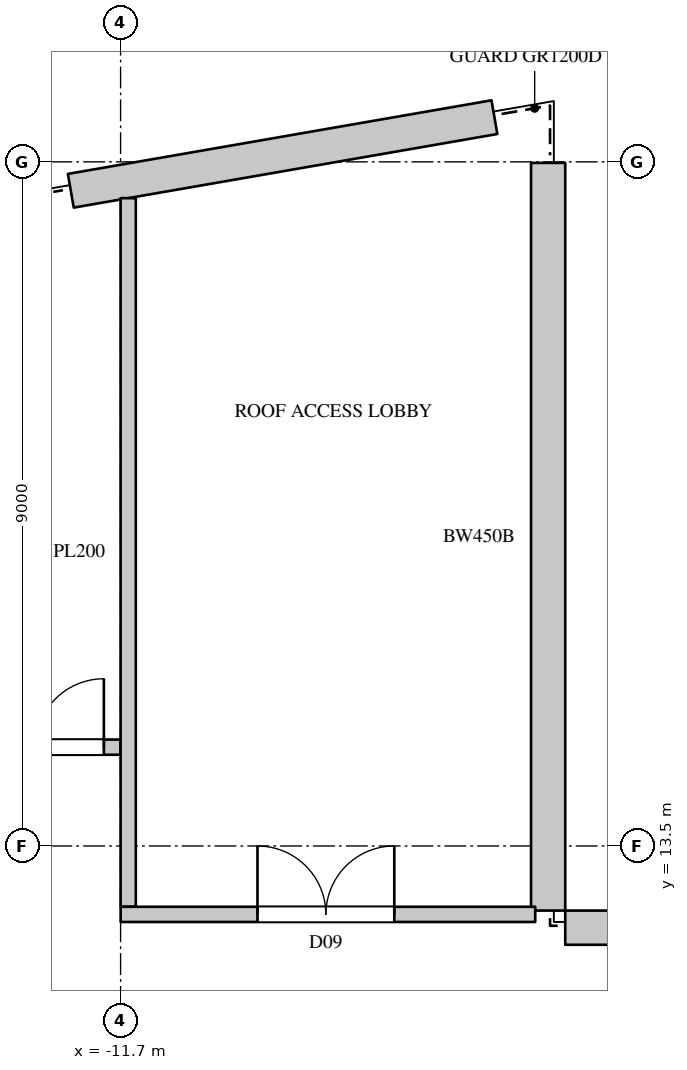
"""IFC4 building model, lengths in metres.
Left out: names, types, materials, properties, quantities, classifications, styles, units other than length and angle.
Written with IfcOpenShell. Run it as: python <this file> out.ifc"""

import sys

from ifc_helpers import new_model, si_unit, direction, frame, frame_2d, origin, place, context, subcontext, project, spatial, rectangle, extrude, element, fill, save


model = new_model("IFC4")
c1 = context("Model", 3, precision=1e-05, world=origin(), true_north=direction((0.0, 1.0)))
c2 = subcontext(c1, "Body", "Model", "MODEL_VIEW")
j1 = project(units=[si_unit("LENGTHUNIT", "METRE"), si_unit("PLANEANGLEUNIT", "RADIAN")], contexts=[c1])
p1 = place(None, origin())
s1 = spatial("IfcSite", under=j1, at=p1, CompositionType="ELEMENT")
p2 = place(p1, origin())
s2 = spatial("IfcBuilding", under=s1, at=p2, CompositionType="ELEMENT")
p3 = place(p2, frame((0.0, 0.0, 355.0)))
s3 = spatial("IfcBuildingStorey", under=s2, at=p3, CompositionType="ELEMENT", Elevation=355.0)
p4 = place(p3, frame((7.85, 12.425, 0.0), z_axis=(0.0, 0.0, 1.0), x_axis=(-1.0, 0.0, 0.0)))
e1 = element("IfcWall", 1, at=p4, inside=s3, PredefinedType="SOLIDWALL", context=c2, shape_type="SweptSolid", body=[
    extrude(rectangle(XDim=13.7, YDim=0.45, at=frame_2d((6.85, 0.0))), origin(), (0.0, 0.0, 1.0), 4.0),
])
p5 = place(p3, frame((-6.075, 12.65, 0.0), z_axis=(0.0, 0.0, 1.0), x_axis=(0.0, 1.0, 0.0)))
e2 = element("IfcWall", 2, at=p5, inside=s3, PredefinedType="SOLIDWALL", context=c2, shape_type="SweptSolid", body=[
    extrude(rectangle(XDim=9.837, YDim=0.45, at=frame_2d((4.918, 0.0))), origin(), (0.0, 0.0, 1.0), 4.0),
])
p6 = place(p3, frame((-6.782, 23.088, 0.0), z_axis=(0.0, 0.0, 1.0), x_axis=(-0.985240251318, -0.171177239091, 0.0)))
e3 = element("IfcWall", 3, at=p6, inside=s3, PredefinedType="SOLIDWALL", context=c2, shape_type="SweptSolid", body=[
    extrude(rectangle(XDim=5.656, YDim=0.45, at=frame_2d((2.828, 0.0))), origin(), (0.0, 0.0, 1.0), 4.0),
])
p7 = place(p3, frame((-13.97, 14.8, 0.0), z_axis=(0.0, 0.0, 1.0), x_axis=(1.0, 0.0, 0.0)))
e4 = element("IfcWall", 4, at=p7, inside=s3, PredefinedType="PARTITIONING", context=c2, shape_type="SweptSolid", body=[
    extrude(rectangle(XDim=2.27, YDim=0.2, at=frame_2d((1.135, 0.0))), origin(), (0.0, 0.0, 1.0), 3.548),
])
p8 = place(p7, frame((0.25, 0.0, 0.0)))
e5 = element("IfcOpeningElement", 5, at=p8, cuts=e4, PredefinedType="OPENING", context=c2, shape_type="SweptSolid", body=[
    extrude(rectangle(XDim=1.8, YDim=2.4, at=frame_2d((0.9, 1.2))), frame((0.0, 0.11, 0.0), z_axis=(0.0, -1.0, 0.0), x_axis=(1.0, 0.0, 0.0)), (0.0, 0.0, 1.0), 0.22),
])
p9 = place(p3, frame((-11.6, 12.701, 0.0), z_axis=(0.0, 0.0, 1.0), x_axis=(0.0, 1.0, 0.0)))
e6 = element("IfcWall", 6, at=p9, inside=s3, PredefinedType="PARTITIONING", context=c2, shape_type="SweptSolid", body=[
    extrude(rectangle(XDim=9.322, YDim=0.2, at=frame_2d((4.661, 0.0))), origin(), (0.0, 0.0, 1.0), 3.548),
])
p10 = place(p3, frame((-11.699, 12.6, 0.0), z_axis=(0.0, 0.0, 1.0), x_axis=(1.0, 0.0, 0.0)))
e7 = element("IfcWall", 7, at=p10, inside=s3, PredefinedType="PARTITIONING", context=c2, shape_type="SweptSolid", body=[
    extrude(rectangle(XDim=5.454, YDim=0.2, at=frame_2d((2.727, 0.0))), origin(), (0.0, 0.0, 1.0), 3.548),
])
p11 = place(p10, frame((1.8, 0.0, 0.0)))
e8 = element("IfcOpeningElement", 8, at=p11, cuts=e7, PredefinedType="OPENING", context=c2, shape_type="SweptSolid", body=[
    extrude(rectangle(XDim=1.8, YDim=2.4, at=frame_2d((0.9, 1.2))), frame((0.0, 0.11, 0.0), z_axis=(0.0, -1.0, 0.0), x_axis=(1.0, 0.0, 0.0)), (0.0, 0.0, 1.0), 0.22),
])
p12 = place(p11, origin())
e9 = element("IfcDoor", 9, at=p12, inside=s3, OperationType="DOUBLE_DOOR_SINGLE_SWING", PredefinedType="DOOR", context=c2, shape_type="SweptSolid", body=[
    extrude(rectangle(XDim=1.8, YDim=2.4, at=frame_2d((0.9, 1.2))), frame((0.0, 0.025, 0.0), z_axis=(0.0, -1.0, 0.0), x_axis=(1.0, 0.0, 0.0)), (0.0, 0.0, 1.0), 0.05),
])
fill(e8, e9)
p13 = place(p8, origin())
e10 = element("IfcDoor", 10, at=p13, inside=s3, OperationType="DOUBLE_DOOR_SINGLE_SWING", PredefinedType="DOOR", context=c2, shape_type="SweptSolid", body=[
    extrude(rectangle(XDim=1.8, YDim=2.4, at=frame_2d((0.9, 1.2))), frame((0.0, 0.025, 0.0), z_axis=(0.0, -1.0, 0.0), x_axis=(1.0, 0.0, 0.0)), (0.0, 0.0, 1.0), 0.05),
])
fill(e5, e10)
save(model, sys.argv[1])
